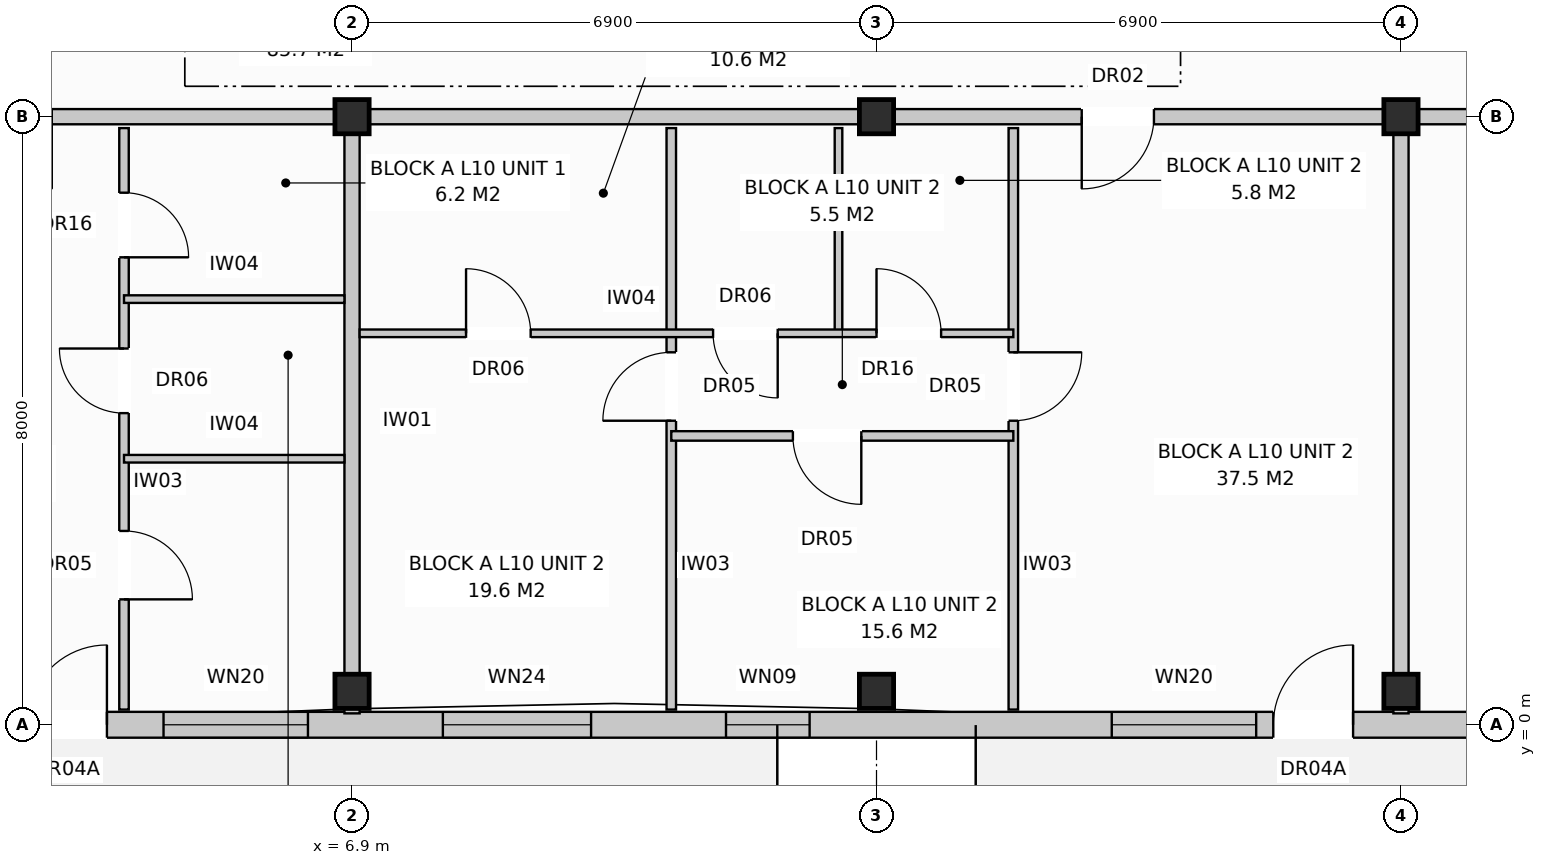
"""IFC4 building model, lengths in metres.
Left out: names, types, materials, properties, quantities, classifications, styles, units other than length and angle.
Written with IfcOpenShell. Run it as: python <this file> out.ifc"""

import sys

from ifc_helpers import new_model, si_unit, direction, frame, frame_2d, origin, origin_with_axes, origin_2d, place, context, subcontext, project, spatial, rectangle, extrude, element, fill, save


model = new_model("IFC4")
c1 = context("Model", 3, precision=1e-05, world=origin(), true_north=direction((0.0, 1.0)))
c2 = subcontext(c1, "Body", "Model", "MODEL_VIEW")
j1 = project(units=[si_unit("LENGTHUNIT", "METRE"), si_unit("PLANEANGLEUNIT", "RADIAN")], contexts=[c1])
p1 = place(None, origin())
s1 = spatial("IfcSite", under=j1, at=p1, CompositionType="ELEMENT")
p2 = place(p1, origin())
s2 = spatial("IfcBuilding", under=s1, at=p2, CompositionType="ELEMENT")
p3 = place(p2, frame((0.0, 0.0, 33.6)))
s3 = spatial("IfcBuildingStorey", under=s2, at=p3, CompositionType="ELEMENT", Elevation=33.6)
for number, where, z_axis, x_axis in (
    (1, (6.9, 0.44, 0.0), (0.0, 0.0, 1.0), (1.0, 0.0, 0.0)),
    (2, (6.9, 8.0, 0.0), (0.0, 0.0, 1.0), (1.0, 0.0, 0.0)),
    (3, (13.8, 0.44, 0.0), (0.0, 0.0, 1.0), (1.0, 0.0, 0.0)),
    (4, (13.8, 8.0, 0.0), (0.0, 0.0, 1.0), (1.0, 0.0, 0.0)),
    (5, (20.7, 0.44, 0.0), (0.0, 0.0, 1.0), (1.0, 0.0, 0.0)),
    (6, (20.7, 8.0, 0.0), (0.0, 0.0, 1.0), (1.0, 0.0, 0.0)),
):
    element("IfcColumn", number, at=place(p3, frame(where, z_axis=z_axis, x_axis=x_axis)), inside=s3, PredefinedType="COLUMN", context=c2, shape_type="SweptSolid", body=[
        extrude(rectangle(XDim=0.45, YDim=0.45, at=origin_2d()), origin(), (0.0, 0.0, 1.0), 3.2),
    ])
p4 = place(p3, frame((0.16, 0.0, 0.0), z_axis=(0.0, 0.0, 1.0), x_axis=(1.0, 0.0, 0.0)))
e7 = element("IfcWall", 7, at=p4, inside=s3, PredefinedType="STANDARD", context=c2, shape_type="SweptSolid", body=[
    extrude(rectangle(XDim=41.08, YDim=0.34, at=frame_2d((20.54, 0.0))), origin(), (0.0, 0.0, 1.0), 2.96),
])
p5 = place(p4, frame((2.465, 0.0, 0.0)))
e8 = element("IfcOpeningElement", 8, at=p5, cuts=e7, PredefinedType="OPENING", context=c2, shape_type="SweptSolid", body=[
    extrude(rectangle(XDim=1.05, YDim=2.12, at=frame_2d((0.525, 1.06))), frame((0.0, 0.182, 0.0), z_axis=(0.0, -1.0, 0.0), x_axis=(1.0, 0.0, 0.0)), (0.0, 0.0, 1.0), 0.364),
])
p6 = place(p4, frame((18.86, 0.0, 0.0)))
e9 = element("IfcOpeningElement", 9, at=p6, cuts=e7, PredefinedType="OPENING", context=c2, shape_type="SweptSolid", body=[
    extrude(rectangle(XDim=1.05, YDim=2.12, at=frame_2d((0.525, 1.06))), frame((0.0, 0.182, 0.0), z_axis=(0.0, -1.0, 0.0), x_axis=(1.0, 0.0, 0.0)), (0.0, 0.0, 1.0), 0.364),
])
p7 = place(p4, frame((32.66, 0.0, 0.0)))
e10 = element("IfcOpeningElement", 10, at=p7, cuts=e7, PredefinedType="OPENING", context=c2, shape_type="SweptSolid", body=[
    extrude(rectangle(XDim=1.05, YDim=2.12, at=frame_2d((0.525, 1.06))), frame((0.0, 0.182, 0.0), z_axis=(0.0, -1.0, 0.0), x_axis=(1.0, 0.0, 0.0)), (0.0, 0.0, 1.0), 0.364),
])
p8 = place(p4, frame((0.76, 0.0, 0.72)))
e11 = element("IfcOpeningElement", 11, at=p8, cuts=e7, PredefinedType="OPENING", context=c2, shape_type="SweptSolid", body=[
    extrude(rectangle(XDim=1.1, YDim=1.5, at=frame_2d((0.55, 0.75))), frame((0.0, 0.182, 0.0), z_axis=(0.0, -1.0, 0.0), x_axis=(1.0, 0.0, 0.0)), (0.0, 0.0, 1.0), 0.364),
])
p9 = place(p4, frame((4.26, 0.0, 0.72)))
e12 = element("IfcOpeningElement", 12, at=p9, cuts=e7, PredefinedType="OPENING", context=c2, shape_type="SweptSolid", body=[
    extrude(rectangle(XDim=1.9, YDim=1.85, at=frame_2d((0.95, 0.925))), frame((0.0, 0.182, 0.0), z_axis=(0.0, -1.0, 0.0), x_axis=(1.0, 0.0, 0.0)), (0.0, 0.0, 1.0), 0.364),
])
p10 = place(p4, frame((7.935, 0.0, 0.8)))
e13 = element("IfcOpeningElement", 13, at=p10, cuts=e7, PredefinedType="OPENING", context=c2, shape_type="SweptSolid", body=[
    extrude(rectangle(XDim=1.95, YDim=1.65, at=frame_2d((0.975, 0.825))), frame((0.0, 0.182, 0.0), z_axis=(0.0, -1.0, 0.0), x_axis=(1.0, 0.0, 0.0)), (0.0, 0.0, 1.0), 0.364),
])
p11 = place(p4, frame((11.66, 0.0, 0.72)))
e14 = element("IfcOpeningElement", 14, at=p11, cuts=e7, PredefinedType="OPENING", context=c2, shape_type="SweptSolid", body=[
    extrude(rectangle(XDim=1.1, YDim=1.5, at=frame_2d((0.55, 0.75))), frame((0.0, 0.182, 0.0), z_axis=(0.0, -1.0, 0.0), x_axis=(1.0, 0.0, 0.0)), (0.0, 0.0, 1.0), 0.364),
])
p12 = place(p4, frame((16.735, 0.0, 0.8)))
e15 = element("IfcOpeningElement", 15, at=p12, cuts=e7, PredefinedType="OPENING", context=c2, shape_type="SweptSolid", body=[
    extrude(rectangle(XDim=1.9, YDim=1.85, at=frame_2d((0.95, 0.925))), frame((0.0, 0.182, 0.0), z_axis=(0.0, -1.0, 0.0), x_axis=(1.0, 0.0, 0.0)), (0.0, 0.0, 1.0), 0.364),
])
p13 = place(p4, frame((22.235, 0.0, 0.8)))
e16 = element("IfcOpeningElement", 16, at=p13, cuts=e7, PredefinedType="OPENING", context=c2, shape_type="SweptSolid", body=[
    extrude(rectangle(XDim=1.95, YDim=1.65, at=frame_2d((0.975, 0.825))), frame((0.0, 0.182, 0.0), z_axis=(0.0, -1.0, 0.0), x_axis=(1.0, 0.0, 0.0)), (0.0, 0.0, 1.0), 0.364),
])
p14 = place(p4, frame((28.36, 0.0, 0.72)))
e17 = element("IfcOpeningElement", 17, at=p14, cuts=e7, PredefinedType="OPENING", context=c2, shape_type="SweptSolid", body=[
    extrude(rectangle(XDim=1.1, YDim=1.5, at=frame_2d((0.55, 0.75))), frame((0.0, 0.182, 0.0), z_axis=(0.0, -1.0, 0.0), x_axis=(1.0, 0.0, 0.0)), (0.0, 0.0, 1.0), 0.364),
])
p15 = place(p4, frame((30.46, 0.0, 0.8)))
e18 = element("IfcOpeningElement", 18, at=p15, cuts=e7, PredefinedType="OPENING", context=c2, shape_type="SweptSolid", body=[
    extrude(rectangle(XDim=1.9, YDim=1.85, at=frame_2d((0.95, 0.925))), frame((0.0, 0.182, 0.0), z_axis=(0.0, -1.0, 0.0), x_axis=(1.0, 0.0, 0.0)), (0.0, 0.0, 1.0), 0.364),
])
p16 = place(p4, frame((35.535, 0.0, 0.8)))
e19 = element("IfcOpeningElement", 19, at=p16, cuts=e7, PredefinedType="OPENING", context=c2, shape_type="SweptSolid", body=[
    extrude(rectangle(XDim=1.95, YDim=1.65, at=frame_2d((0.975, 0.825))), frame((0.0, 0.182, 0.0), z_axis=(0.0, -1.0, 0.0), x_axis=(1.0, 0.0, 0.0)), (0.0, 0.0, 1.0), 0.364),
])
p17 = place(p4, frame((39.26, 0.0, 0.72)))
e20 = element("IfcOpeningElement", 20, at=p17, cuts=e7, PredefinedType="OPENING", context=c2, shape_type="SweptSolid", body=[
    extrude(rectangle(XDim=1.1, YDim=1.5, at=frame_2d((0.55, 0.75))), frame((0.0, 0.182, 0.0), z_axis=(0.0, -1.0, 0.0), x_axis=(1.0, 0.0, 0.0)), (0.0, 0.0, 1.0), 0.364),
])
p18 = place(p3, frame((6.9, 7.85, 0.0), z_axis=(0.0, 0.0, 1.0), x_axis=(0.0, -1.0, 0.0)))
e21 = element("IfcWall", 21, at=p18, inside=s3, PredefinedType="PARTITIONING", context=c2, shape_type="SweptSolid", body=[
    extrude(rectangle(XDim=7.7, YDim=0.2, at=frame_2d((3.85, 0.0))), origin(), (0.0, 0.0, 1.0), 2.4),
])
p19 = place(p3, frame((0.0, 8.0, 0.0), z_axis=(0.0, 0.0, 1.0), x_axis=(1.0, 0.0, 0.0)))
e22 = element("IfcWall", 22, at=p19, inside=s3, PredefinedType="PARTITIONING", context=c2, shape_type="SweptSolid", body=[
    extrude(rectangle(XDim=6.9, YDim=0.2, at=frame_2d((3.45, 0.0))), origin(), (0.0, 0.0, 1.0), 2.4),
])
p20 = place(p19, frame((2.0, 0.0, 0.0)))
e23 = element("IfcOpeningElement", 23, at=p20, cuts=e22, PredefinedType="OPENING", context=c2, shape_type="SweptSolid", body=[
    extrude(rectangle(XDim=0.95, YDim=2.15, at=frame_2d((0.475, 1.075))), frame((0.0, 0.112, 0.0), z_axis=(0.0, -1.0, 0.0), x_axis=(1.0, 0.0, 0.0)), (0.0, 0.0, 1.0), 0.224),
])
p21 = place(p3, frame((3.9, 7.85, 0.0), z_axis=(0.0, 0.0, 1.0), x_axis=(0.0, -1.0, 0.0)))
e24 = element("IfcWall", 24, at=p21, inside=s3, PredefinedType="PARTITIONING", context=c2, shape_type="SweptSolid", body=[
    extrude(rectangle(XDim=7.65, YDim=0.125, at=frame_2d((3.825, 0.0))), origin(), (0.0, 0.0, 1.0), 2.96),
])
p22 = place(p21, frame((0.85, 0.0, 0.0)))
e25 = element("IfcOpeningElement", 25, at=p22, cuts=e24, PredefinedType="OPENING", context=c2, shape_type="SweptSolid", body=[
    extrude(rectangle(XDim=0.85, YDim=2.1, at=frame_2d((0.425, 1.05))), frame((0.0, 0.074, 0.0), z_axis=(0.0, -1.0, 0.0), x_axis=(1.0, 0.0, 0.0)), (0.0, 0.0, 1.0), 0.149),
])
p23 = place(p21, frame((2.9, 0.0, 0.0)))
e26 = element("IfcOpeningElement", 26, at=p23, cuts=e24, PredefinedType="OPENING", context=c2, shape_type="SweptSolid", body=[
    extrude(rectangle(XDim=0.85, YDim=2.05, at=frame_2d((0.425, 1.025))), frame((0.0, 0.074, 0.0), z_axis=(0.0, -1.0, 0.0), x_axis=(1.0, 0.0, 0.0)), (0.0, 0.0, 1.0), 0.149),
])
p24 = place(p21, frame((5.3, 0.0, 0.0)))
e27 = element("IfcOpeningElement", 27, at=p24, cuts=e24, PredefinedType="OPENING", context=c2, shape_type="SweptSolid", body=[
    extrude(rectangle(XDim=0.9, YDim=2.1, at=frame_2d((0.45, 1.05))), frame((0.0, 0.074, 0.0), z_axis=(0.0, -1.0, 0.0), x_axis=(1.0, 0.0, 0.0)), (0.0, 0.0, 1.0), 0.149),
])
for number, where, z_axis, x_axis in (
    (28, (3.9, 5.6, 0.0), (0.0, 0.0, 1.0), (1.0, 0.0, 0.0)),
    (29, (3.9, 3.5, 0.0), (0.0, 0.0, 1.0), (1.0, 0.0, 0.0)),
):
    element("IfcWall", number, at=place(p3, frame(where, z_axis=z_axis, x_axis=x_axis)), inside=s3, PredefinedType="PARTITIONING", context=c2, shape_type="SweptSolid", body=[
        extrude(rectangle(XDim=2.9, YDim=0.1, at=frame_2d((1.45, 0.0))), origin(), (0.0, 0.0, 1.0), 2.96),
    ])
p25 = place(p3, frame((20.7, 7.85, 0.0), z_axis=(0.0, 0.0, 1.0), x_axis=(0.0, -1.0, 0.0)))
e30 = element("IfcWall", 30, at=p25, inside=s3, PredefinedType="PARTITIONING", context=c2, shape_type="SweptSolid", body=[
    extrude(rectangle(XDim=7.7, YDim=0.2, at=frame_2d((3.85, 0.0))), origin(), (0.0, 0.0, 1.0), 2.96),
])
p26 = place(p3, frame((6.9, 8.0, 0.0), z_axis=(0.0, 0.0, 1.0), x_axis=(1.0, 0.0, 0.0)))
e31 = element("IfcWall", 31, at=p26, inside=s3, PredefinedType="PARTITIONING", context=c2, shape_type="SweptSolid", body=[
    extrude(rectangle(XDim=13.8, YDim=0.2, at=frame_2d((6.9, 0.0))), origin(), (0.0, 0.0, 1.0), 2.4),
])
p27 = place(p26, frame((9.6, 0.0, 0.0)))
e32 = element("IfcOpeningElement", 32, at=p27, cuts=e31, PredefinedType="OPENING", context=c2, shape_type="SweptSolid", body=[
    extrude(rectangle(XDim=0.95, YDim=2.15, at=frame_2d((0.475, 1.075))), frame((0.0, 0.112, 0.0), z_axis=(0.0, -1.0, 0.0), x_axis=(1.0, 0.0, 0.0)), (0.0, 0.0, 1.0), 0.224),
])
p28 = place(p3, frame((15.6, 7.85, 0.0), z_axis=(0.0, 0.0, 1.0), x_axis=(0.0, -1.0, 0.0)))
e33 = element("IfcWall", 33, at=p28, inside=s3, PredefinedType="PARTITIONING", context=c2, shape_type="SweptSolid", body=[
    extrude(rectangle(XDim=7.65, YDim=0.125, at=frame_2d((3.825, 0.0))), origin(), (0.0, 0.0, 1.0), 2.59),
])
p29 = place(p28, frame((2.95, 0.0, 0.0)))
e34 = element("IfcOpeningElement", 34, at=p29, cuts=e33, PredefinedType="OPENING", context=c2, shape_type="SweptSolid", body=[
    extrude(rectangle(XDim=0.9, YDim=2.1, at=frame_2d((0.45, 1.05))), frame((0.0, 0.074, 0.0), z_axis=(0.0, -1.0, 0.0), x_axis=(1.0, 0.0, 0.0)), (0.0, 0.0, 1.0), 0.149),
])
p30 = place(p3, frame((11.1, 7.85, 0.0), z_axis=(0.0, 0.0, 1.0), x_axis=(0.0, -1.0, 0.0)))
e35 = element("IfcWall", 35, at=p30, inside=s3, PredefinedType="PARTITIONING", context=c2, shape_type="SweptSolid", body=[
    extrude(rectangle(XDim=7.65, YDim=0.125, at=frame_2d((3.825, 0.0))), origin(), (0.0, 0.0, 1.0), 2.96),
])
p31 = place(p30, frame((2.95, 0.0, 0.0)))
e36 = element("IfcOpeningElement", 36, at=p31, cuts=e35, PredefinedType="OPENING", context=c2, shape_type="SweptSolid", body=[
    extrude(rectangle(XDim=0.9, YDim=2.1, at=frame_2d((0.45, 1.05))), frame((0.0, 0.074, 0.0), z_axis=(0.0, -1.0, 0.0), x_axis=(1.0, 0.0, 0.0)), (0.0, 0.0, 1.0), 0.149),
])
p32 = place(p3, frame((13.3, 7.85, 0.0), z_axis=(0.0, 0.0, 1.0), x_axis=(0.0, -1.0, 0.0)))
e37 = element("IfcWall", 37, at=p32, inside=s3, PredefinedType="PARTITIONING", context=c2, shape_type="SweptSolid", body=[
    extrude(rectangle(XDim=2.7, YDim=0.1, at=frame_2d((1.35, 0.0))), origin(), (0.0, 0.0, 1.0), 2.96),
])
p33 = place(p3, frame((7.0, 5.15, 0.0), z_axis=(0.0, 0.0, 1.0), x_axis=(1.0, 0.0, 0.0)))
e38 = element("IfcWall", 38, at=p33, inside=s3, PredefinedType="PARTITIONING", context=c2, shape_type="SweptSolid", body=[
    extrude(rectangle(XDim=8.6, YDim=0.1, at=frame_2d((4.3, 0.0))), origin(), (0.0, 0.0, 1.0), 2.96),
])
p34 = place(p33, frame((1.4, 0.0, 0.0)))
e39 = element("IfcOpeningElement", 39, at=p34, cuts=e38, PredefinedType="OPENING", context=c2, shape_type="SweptSolid", body=[
    extrude(rectangle(XDim=0.85, YDim=2.05, at=frame_2d((0.425, 1.025))), frame((0.0, 0.062, 0.0), z_axis=(0.0, -1.0, 0.0), x_axis=(1.0, 0.0, 0.0)), (0.0, 0.0, 1.0), 0.124),
])
p35 = place(p33, frame((4.65, 0.0, 0.0)))
e40 = element("IfcOpeningElement", 40, at=p35, cuts=e38, PredefinedType="OPENING", context=c2, shape_type="SweptSolid", body=[
    extrude(rectangle(XDim=0.85, YDim=2.05, at=frame_2d((0.425, 1.025))), frame((0.0, 0.062, 0.0), z_axis=(0.0, -1.0, 0.0), x_axis=(1.0, 0.0, 0.0)), (0.0, 0.0, 1.0), 0.124),
])
p36 = place(p33, frame((6.8, 0.0, 0.0)))
e41 = element("IfcOpeningElement", 41, at=p36, cuts=e38, PredefinedType="OPENING", context=c2, shape_type="SweptSolid", body=[
    extrude(rectangle(XDim=0.85, YDim=2.1, at=frame_2d((0.425, 1.05))), frame((0.0, 0.062, 0.0), z_axis=(0.0, -1.0, 0.0), x_axis=(1.0, 0.0, 0.0)), (0.0, 0.0, 1.0), 0.124),
])
p37 = place(p3, frame((11.1, 3.8, 0.0), z_axis=(0.0, 0.0, 1.0), x_axis=(1.0, 0.0, 0.0)))
e42 = element("IfcWall", 42, at=p37, inside=s3, PredefinedType="PARTITIONING", context=c2, shape_type="SweptSolid", body=[
    extrude(rectangle(XDim=4.5, YDim=0.125, at=frame_2d((2.25, 0.0))), origin(), (0.0, 0.0, 1.0), 2.96),
])
p38 = place(p37, frame((1.6, 0.0, 0.0)))
e43 = element("IfcOpeningElement", 43, at=p38, cuts=e42, PredefinedType="OPENING", context=c2, shape_type="SweptSolid", body=[
    extrude(rectangle(XDim=0.9, YDim=2.1, at=frame_2d((0.45, 1.05))), frame((0.0, 0.074, 0.0), z_axis=(0.0, -1.0, 0.0), x_axis=(1.0, 0.0, 0.0)), (0.0, 0.0, 1.0), 0.149),
])
p39 = place(p3, frame((20.7, 8.0, 0.0), z_axis=(0.0, 0.0, 1.0), x_axis=(1.0, 0.0, 0.0)))
e44 = element("IfcWall", 44, at=p39, inside=s3, PredefinedType="PARTITIONING", context=c2, shape_type="SweptSolid", body=[
    extrude(rectangle(XDim=13.8, YDim=0.2, at=frame_2d((6.9, 0.0))), origin(), (0.0, 0.0, 1.0), 2.4),
])
p40 = place(p39, frame((2.4, 0.0, 0.0)))
e45 = element("IfcOpeningElement", 45, at=p40, cuts=e44, PredefinedType="OPENING", context=c2, shape_type="SweptSolid", body=[
    extrude(rectangle(XDim=0.95, YDim=2.15, at=frame_2d((0.475, 1.075))), frame((0.0, 0.112, 0.0), z_axis=(0.0, -1.0, 0.0), x_axis=(1.0, 0.0, 0.0)), (0.0, 0.0, 1.0), 0.224),
])
p41 = place(p5, origin_with_axes())
e46 = element("IfcDoor", 46, at=p41, inside=s3, OperationType="SINGLE_SWING_RIGHT", PredefinedType="DOOR", context=c2, shape_type="SweptSolid", body=[
    extrude(rectangle(XDim=1.05, YDim=2.12, at=frame_2d((0.525, 1.06))), frame((0.0, 0.025, 0.0), z_axis=(0.0, -1.0, 0.0), x_axis=(1.0, 0.0, 0.0)), (0.0, 0.0, 1.0), 0.05),
])
fill(e8, e46)
p42 = place(p6, origin_with_axes())
e47 = element("IfcDoor", 47, at=p42, inside=s3, OperationType="SINGLE_SWING_RIGHT", PredefinedType="DOOR", context=c2, shape_type="SweptSolid", body=[
    extrude(rectangle(XDim=1.05, YDim=2.12, at=frame_2d((0.525, 1.06))), frame((0.0, 0.025, 0.0), z_axis=(0.0, -1.0, 0.0), x_axis=(1.0, 0.0, 0.0)), (0.0, 0.0, 1.0), 0.05),
])
fill(e9, e47)
p43 = place(p9, origin_with_axes())
e48 = element("IfcWindow", 48, at=p43, inside=s3, PartitioningType="SINGLE_PANEL", PredefinedType="WINDOW", context=c2, shape_type="SweptSolid", body=[
    extrude(rectangle(XDim=1.9, YDim=1.85, at=frame_2d((0.95, 0.925))), frame((0.0, 0.03, 0.0), z_axis=(0.0, -1.0, 0.0), x_axis=(1.0, 0.0, 0.0)), (0.0, 0.0, 1.0), 0.06),
])
fill(e12, e48)
p44 = place(p10, origin_with_axes())
e49 = element("IfcWindow", 49, at=p44, inside=s3, PartitioningType="SINGLE_PANEL", PredefinedType="WINDOW", context=c2, shape_type="SweptSolid", body=[
    extrude(rectangle(XDim=1.95, YDim=1.65, at=frame_2d((0.975, 0.825))), frame((0.0, 0.03, 0.0), z_axis=(0.0, -1.0, 0.0), x_axis=(1.0, 0.0, 0.0)), (0.0, 0.0, 1.0), 0.06),
])
fill(e13, e49)
p45 = place(p11, origin_with_axes())
e50 = element("IfcWindow", 50, at=p45, inside=s3, PartitioningType="SINGLE_PANEL", PredefinedType="WINDOW", context=c2, shape_type="SweptSolid", body=[
    extrude(rectangle(XDim=1.1, YDim=1.5, at=frame_2d((0.55, 0.75))), frame((0.0, 0.03, 0.0), z_axis=(0.0, -1.0, 0.0), x_axis=(1.0, 0.0, 0.0)), (0.0, 0.0, 1.0), 0.06),
])
fill(e14, e50)
p46 = place(p12, origin_with_axes())
e51 = element("IfcWindow", 51, at=p46, inside=s3, PartitioningType="SINGLE_PANEL", PredefinedType="WINDOW", context=c2, shape_type="SweptSolid", body=[
    extrude(rectangle(XDim=1.9, YDim=1.85, at=frame_2d((0.95, 0.925))), frame((0.0, 0.03, 0.0), z_axis=(0.0, -1.0, 0.0), x_axis=(1.0, 0.0, 0.0)), (0.0, 0.0, 1.0), 0.06),
])
fill(e15, e51)
p47 = place(p22, origin_with_axes())
e52 = element("IfcDoor", 52, at=p47, inside=s3, OperationType="SINGLE_SWING_RIGHT", PredefinedType="DOOR", context=c2, shape_type="SweptSolid", body=[
    extrude(rectangle(XDim=0.85, YDim=2.1, at=frame_2d((0.425, 1.05))), frame((0.0, 0.025, 0.0), z_axis=(0.0, -1.0, 0.0), x_axis=(1.0, 0.0, 0.0)), (0.0, 0.0, 1.0), 0.05),
])
fill(e25, e52)
p48 = place(p23, frame((0.85, 0.0, 0.0), z_axis=(0.0, 0.0, 1.0), x_axis=(-1.0, 0.0, 0.0)))
e53 = element("IfcDoor", 53, at=p48, inside=s3, OperationType="SINGLE_SWING_LEFT", PredefinedType="DOOR", context=c2, shape_type="SweptSolid", body=[
    extrude(rectangle(XDim=0.85, YDim=2.05, at=frame_2d((0.425, 1.025))), frame((0.0, 0.025, 0.0), z_axis=(0.0, -1.0, 0.0), x_axis=(1.0, 0.0, 0.0)), (0.0, 0.0, 1.0), 0.05),
])
fill(e26, e53)
p49 = place(p24, origin_with_axes())
e54 = element("IfcDoor", 54, at=p49, inside=s3, OperationType="SINGLE_SWING_RIGHT", PredefinedType="DOOR", context=c2, shape_type="SweptSolid", body=[
    extrude(rectangle(XDim=0.9, YDim=2.1, at=frame_2d((0.45, 1.05))), frame((0.0, 0.025, 0.0), z_axis=(0.0, -1.0, 0.0), x_axis=(1.0, 0.0, 0.0)), (0.0, 0.0, 1.0), 0.05),
])
fill(e27, e54)
p50 = place(p27, frame((0.95, 0.0, 0.0), z_axis=(0.0, 0.0, 1.0), x_axis=(-1.0, 0.0, 0.0)))
e55 = element("IfcDoor", 55, at=p50, inside=s3, OperationType="SINGLE_SWING_LEFT", PredefinedType="DOOR", context=c2, shape_type="SweptSolid", body=[
    extrude(rectangle(XDim=0.95, YDim=2.15, at=frame_2d((0.475, 1.075))), frame((0.0, 0.025, 0.0), z_axis=(0.0, -1.0, 0.0), x_axis=(1.0, 0.0, 0.0)), (0.0, 0.0, 1.0), 0.05),
])
fill(e32, e55)
p51 = place(p29, origin_with_axes())
e56 = element("IfcDoor", 56, at=p51, inside=s3, OperationType="SINGLE_SWING_LEFT", PredefinedType="DOOR", context=c2, shape_type="SweptSolid", body=[
    extrude(rectangle(XDim=0.9, YDim=2.1, at=frame_2d((0.45, 1.05))), frame((0.0, 0.025, 0.0), z_axis=(0.0, -1.0, 0.0), x_axis=(1.0, 0.0, 0.0)), (0.0, 0.0, 1.0), 0.05),
])
fill(e34, e56)
p52 = place(p31, frame((0.9, 0.0, 0.0), z_axis=(0.0, 0.0, 1.0), x_axis=(-1.0, 0.0, 0.0)))
e57 = element("IfcDoor", 57, at=p52, inside=s3, OperationType="SINGLE_SWING_RIGHT", PredefinedType="DOOR", context=c2, shape_type="SweptSolid", body=[
    extrude(rectangle(XDim=0.9, YDim=2.1, at=frame_2d((0.45, 1.05))), frame((0.0, 0.025, 0.0), z_axis=(0.0, -1.0, 0.0), x_axis=(1.0, 0.0, 0.0)), (0.0, 0.0, 1.0), 0.05),
])
fill(e36, e57)
p53 = place(p34, origin_with_axes())
e58 = element("IfcDoor", 58, at=p53, inside=s3, OperationType="SINGLE_SWING_LEFT", PredefinedType="DOOR", context=c2, shape_type="SweptSolid", body=[
    extrude(rectangle(XDim=0.85, YDim=2.05, at=frame_2d((0.425, 1.025))), frame((0.0, 0.025, 0.0), z_axis=(0.0, -1.0, 0.0), x_axis=(1.0, 0.0, 0.0)), (0.0, 0.0, 1.0), 0.05),
])
fill(e39, e58)
p54 = place(p35, frame((0.85, 0.0, 0.0), z_axis=(0.0, 0.0, 1.0), x_axis=(-1.0, 0.0, 0.0)))
e59 = element("IfcDoor", 59, at=p54, inside=s3, OperationType="SINGLE_SWING_RIGHT", PredefinedType="DOOR", context=c2, shape_type="SweptSolid", body=[
    extrude(rectangle(XDim=0.85, YDim=2.05, at=frame_2d((0.425, 1.025))), frame((0.0, 0.025, 0.0), z_axis=(0.0, -1.0, 0.0), x_axis=(1.0, 0.0, 0.0)), (0.0, 0.0, 1.0), 0.05),
])
fill(e40, e59)
p55 = place(p36, origin_with_axes())
e60 = element("IfcDoor", 60, at=p55, inside=s3, OperationType="SINGLE_SWING_LEFT", PredefinedType="DOOR", context=c2, shape_type="SweptSolid", body=[
    extrude(rectangle(XDim=0.85, YDim=2.1, at=frame_2d((0.425, 1.05))), frame((0.0, 0.025, 0.0), z_axis=(0.0, -1.0, 0.0), x_axis=(1.0, 0.0, 0.0)), (0.0, 0.0, 1.0), 0.05),
])
fill(e41, e60)
p56 = place(p38, frame((0.9, 0.0, 0.0), z_axis=(0.0, 0.0, 1.0), x_axis=(-1.0, 0.0, 0.0)))
e61 = element("IfcDoor", 61, at=p56, inside=s3, OperationType="SINGLE_SWING_RIGHT", PredefinedType="DOOR", context=c2, shape_type="SweptSolid", body=[
    extrude(rectangle(XDim=0.9, YDim=2.1, at=frame_2d((0.45, 1.05))), frame((0.0, 0.025, 0.0), z_axis=(0.0, -1.0, 0.0), x_axis=(1.0, 0.0, 0.0)), (0.0, 0.0, 1.0), 0.05),
])
fill(e43, e61)
save(model, sys.argv[1])
